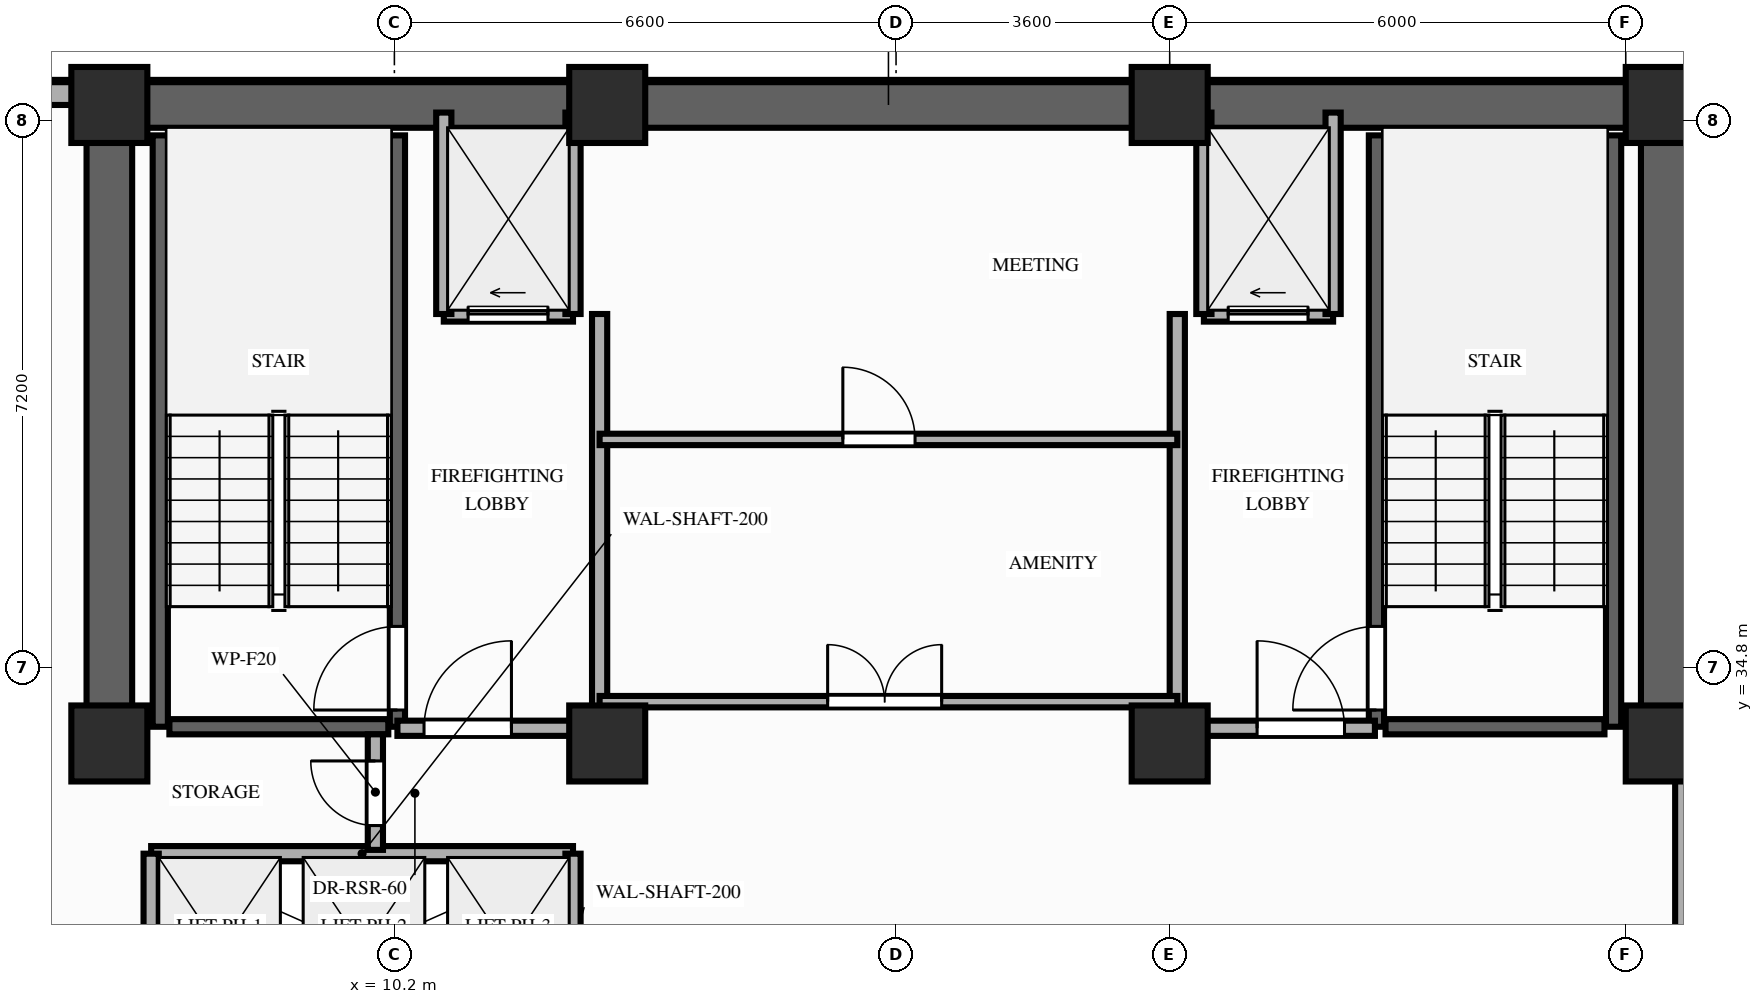
"""IFC4 building model, lengths in metres.
Left out: names, types, materials, properties, quantities, classifications, styles, units other than length and angle.
Written with IfcOpenShell. Run it as: python <this file> out.ifc"""

import sys

from ifc_helpers import new_model, si_unit, direction, frame, frame_2d, origin, origin_2d, place, context, subcontext, project, spatial, rectangle, extrude, element, fill, save


model = new_model("IFC4")
c1 = context("Model", 3, precision=1e-05, world=origin(), true_north=direction((0.0, 1.0)))
c2 = subcontext(c1, "Body", "Model", "MODEL_VIEW")
j1 = project(units=[si_unit("LENGTHUNIT", "METRE"), si_unit("PLANEANGLEUNIT", "RADIAN")], contexts=[c1])
p1 = place(None, origin())
s1 = spatial("IfcSite", under=j1, at=p1, CompositionType="ELEMENT")
p2 = place(p1, origin())
s2 = spatial("IfcBuilding", under=s1, at=p2, CompositionType="ELEMENT")
p3 = place(p2, frame((0.0, 0.0, 176.0)))
s3 = spatial("IfcBuildingStorey", under=s2, at=p3, CompositionType="ELEMENT", Elevation=176.0)
for number, where, z_axis, x_axis in (
    (1, (6.45, 33.8, 0.0), (0.0, 0.0, 1.0), (1.0, 0.0, 0.0)),
    (2, (13.0, 33.8, 0.0), (0.0, 0.0, 1.0), (1.0, 0.0, 0.0)),
    (3, (20.4, 33.8, 0.0), (0.0, 0.0, 1.0), (1.0, 0.0, 0.0)),
    (4, (26.9, 33.8, 0.0), (0.0, 0.0, 1.0), (1.0, 0.0, 0.0)),
    (5, (6.45, 42.2, 0.0), (0.0, 0.0, 1.0), (1.0, 0.0, 0.0)),
    (6, (13.0, 42.2, 0.0), (0.0, 0.0, 1.0), (1.0, 0.0, 0.0)),
    (7, (20.4, 42.2, 0.0), (0.0, 0.0, 1.0), (1.0, 0.0, 0.0)),
    (8, (26.9, 42.2, 0.0), (0.0, 0.0, 1.0), (1.0, 0.0, 0.0)),
):
    element("IfcColumn", number, at=place(p3, frame(where, z_axis=z_axis, x_axis=x_axis)), inside=s3, PredefinedType="COLUMN", context=c2, shape_type="SweptSolid", body=[
        extrude(rectangle(XDim=1.0, YDim=1.0, at=origin_2d()), origin(), (0.0, 0.0, 1.0), 3.2),
    ])
p4 = place(p3, frame((6.0, 42.35, 0.0), z_axis=(0.0, 0.0, 1.0), x_axis=(-1.0, 0.0, 0.0)))
e9 = element("IfcWall", 9, at=p4, inside=s3, PredefinedType="STANDARD", context=c2, shape_type="SweptSolid", body=[
    extrude(rectangle(XDim=2.0, YDim=0.3, at=frame_2d((1.0, 0.0))), origin(), (0.0, 0.0, 1.0), 3.02),
])
p5 = place(p3, frame((6.45, 42.2, 0.0), z_axis=(0.0, 0.0, 1.0), x_axis=(1.0, 0.0, 0.0)))
e10 = element("IfcWall", 10, at=p5, inside=s3, PredefinedType="SHEAR", context=c2, shape_type="SweptSolid", body=[
    extrude(rectangle(XDim=20.45, YDim=0.6, at=frame_2d((10.225, 0.0))), origin(), (0.0, 0.0, 1.0), 3.02),
])
for number, where, z_axis, x_axis in (
    (11, (6.45, 33.8, 0.0), (0.0, 0.0, 1.0), (0.0, 1.0, 0.0)),
    (12, (26.9, 33.8, 0.0), (0.0, 0.0, 1.0), (0.0, 1.0, 0.0)),
):
    element("IfcWall", number, at=place(p3, frame(where, z_axis=z_axis, x_axis=x_axis)), inside=s3, PredefinedType="SHEAR", context=c2, shape_type="SweptSolid", body=[
        extrude(rectangle(XDim=7.95, YDim=0.6, at=frame_2d((3.975, 0.0))), origin(), (0.0, 0.0, 1.0), 3.02),
    ])
p6 = place(p3, frame((7.12, 34.02, 0.0), z_axis=(0.0, 0.0, 1.0), x_axis=(0.0, 1.0, 0.0)))
e13 = element("IfcWall", 13, at=p6, inside=s3, PredefinedType="SHEAR", context=c2, shape_type="SweptSolid", body=[
    extrude(rectangle(XDim=7.78, YDim=0.2, at=frame_2d((3.89, 0.0))), origin(), (0.0, 0.0, 1.0), 3.02),
])
p7 = place(p3, frame((10.24, 34.02, 0.0), z_axis=(0.0, 0.0, 1.0), x_axis=(0.0, 1.0, 0.0)))
e14 = element("IfcWall", 14, at=p7, inside=s3, PredefinedType="SHEAR", context=c2, shape_type="SweptSolid", body=[
    extrude(rectangle(XDim=7.78, YDim=0.2, at=frame_2d((3.89, 0.0))), origin(), (0.0, 0.0, 1.0), 3.02),
])
p8 = place(p7, frame((0.22, 0.0, 0.0)))
e15 = element("IfcOpeningElement", 15, at=p8, cuts=e14, PredefinedType="OPENING", context=c2, shape_type="SweptSolid", body=[
    extrude(rectangle(XDim=1.1, YDim=2.15, at=frame_2d((0.55, 1.075))), frame((0.0, 0.11, 0.0), z_axis=(0.0, -1.0, 0.0), x_axis=(1.0, 0.0, 0.0)), (0.0, 0.0, 1.0), 0.22),
])
p9 = place(p3, frame((7.24, 34.02, 0.0), z_axis=(0.0, 0.0, 1.0), x_axis=(1.0, 0.0, 0.0)))
e16 = element("IfcWall", 16, at=p9, inside=s3, PredefinedType="SHEAR", context=c2, shape_type="SweptSolid", body=[
    extrude(rectangle(XDim=2.88, YDim=0.2, at=frame_2d((1.44, 0.0))), origin(), (0.0, 0.0, 1.0), 3.02),
])
p10 = place(p3, frame((23.12, 34.02, 0.0), z_axis=(0.0, 0.0, 1.0), x_axis=(0.0, 1.0, 0.0)))
e17 = element("IfcWall", 17, at=p10, inside=s3, PredefinedType="SHEAR", context=c2, shape_type="SweptSolid", body=[
    extrude(rectangle(XDim=7.78, YDim=0.2, at=frame_2d((3.89, 0.0))), origin(), (0.0, 0.0, 1.0), 3.02),
])
p11 = place(p10, frame((0.22, 0.0, 0.0)))
e18 = element("IfcOpeningElement", 18, at=p11, cuts=e17, PredefinedType="OPENING", context=c2, shape_type="SweptSolid", body=[
    extrude(rectangle(XDim=1.1, YDim=2.15, at=frame_2d((0.55, 1.075))), frame((0.0, 0.11, 0.0), z_axis=(0.0, -1.0, 0.0), x_axis=(1.0, 0.0, 0.0)), (0.0, 0.0, 1.0), 0.22),
])
p12 = place(p3, frame((26.24, 34.02, 0.0), z_axis=(0.0, 0.0, 1.0), x_axis=(0.0, 1.0, 0.0)))
e19 = element("IfcWall", 19, at=p12, inside=s3, PredefinedType="SHEAR", context=c2, shape_type="SweptSolid", body=[
    extrude(rectangle(XDim=7.78, YDim=0.2, at=frame_2d((3.89, 0.0))), origin(), (0.0, 0.0, 1.0), 3.02),
])
p13 = place(p3, frame((23.24, 34.02, 0.0), z_axis=(0.0, 0.0, 1.0), x_axis=(1.0, 0.0, 0.0)))
e20 = element("IfcWall", 20, at=p13, inside=s3, PredefinedType="SHEAR", context=c2, shape_type="SweptSolid", body=[
    extrude(rectangle(XDim=2.88, YDim=0.2, at=frame_2d((1.44, 0.0))), origin(), (0.0, 0.0, 1.0), 3.02),
])
p14 = place(p3, frame((7.0, 32.35, 0.0), z_axis=(0.0, 0.0, 1.0), x_axis=(1.0, 0.0, 0.0)))
e21 = element("IfcWall", 21, at=p14, inside=s3, PredefinedType="MOVABLE", context=c2, shape_type="SweptSolid", body=[
    extrude(rectangle(XDim=5.55, YDim=0.2, at=frame_2d((2.775, 0.0))), origin(), (0.0, 0.0, 1.0), 3.02),
])
for number, where, z_axis, x_axis in (
    (22, (7.0, 29.85, 0.0), (0.0, 0.0, 1.0), (0.0, 1.0, 0.0)),
    (23, (12.55, 29.85, 0.0), (0.0, 0.0, 1.0), (0.0, 1.0, 0.0)),
):
    element("IfcWall", number, at=place(p3, frame(where, z_axis=z_axis, x_axis=x_axis)), inside=s3, PredefinedType="MOVABLE", context=c2, shape_type="SweptSolid", body=[
        extrude(rectangle(XDim=2.5, YDim=0.2, at=frame_2d((1.25, 0.0))), origin(), (0.0, 0.0, 1.0), 3.02),
    ])
p15 = place(p3, frame((10.85, 39.45, 0.0), z_axis=(0.0, 0.0, 1.0), x_axis=(1.0, 0.0, 0.0)))
e24 = element("IfcWall", 24, at=p15, inside=s3, PredefinedType="MOVABLE", context=c2, shape_type="SweptSolid", body=[
    extrude(rectangle(XDim=1.7, YDim=0.2, at=frame_2d((0.85, 0.0))), origin(), (0.0, 0.0, 1.0), 3.02),
])
p16 = place(p15, frame((0.32, 0.0, 0.0)))
e25 = element("IfcOpeningElement", 25, at=p16, cuts=e24, PredefinedType="OPENING", context=c2, shape_type="SweptSolid", body=[
    extrude(rectangle(XDim=1.05, YDim=2.15, at=frame_2d((0.525, 1.075))), frame((0.0, 0.11, 0.0), z_axis=(0.0, -1.0, 0.0), x_axis=(1.0, 0.0, 0.0)), (0.0, 0.0, 1.0), 0.22),
])
p17 = place(p3, frame((20.85, 39.45, 0.0), z_axis=(0.0, 0.0, 1.0), x_axis=(1.0, 0.0, 0.0)))
e26 = element("IfcWall", 26, at=p17, inside=s3, PredefinedType="MOVABLE", context=c2, shape_type="SweptSolid", body=[
    extrude(rectangle(XDim=1.7, YDim=0.2, at=frame_2d((0.85, 0.0))), origin(), (0.0, 0.0, 1.0), 3.02),
])
p18 = place(p17, frame((0.32, 0.0, 0.0)))
e27 = element("IfcOpeningElement", 27, at=p18, cuts=e26, PredefinedType="OPENING", context=c2, shape_type="SweptSolid", body=[
    extrude(rectangle(XDim=1.05, YDim=2.15, at=frame_2d((0.525, 1.075))), frame((0.0, 0.11, 0.0), z_axis=(0.0, -1.0, 0.0), x_axis=(1.0, 0.0, 0.0)), (0.0, 0.0, 1.0), 0.22),
])
for number, where, z_axis, x_axis in (
    (28, (10.85, 39.45, 0.0), (0.0, 0.0, 1.0), (0.0, 1.0, 0.0)),
    (29, (12.55, 39.45, 0.0), (0.0, 0.0, 1.0), (0.0, 1.0, 0.0)),
):
    element("IfcWall", number, at=place(p3, frame(where, z_axis=z_axis, x_axis=x_axis)), inside=s3, PredefinedType="MOVABLE", context=c2, shape_type="SweptSolid", body=[
        extrude(rectangle(XDim=2.65, YDim=0.2, at=frame_2d((1.325, 0.0))), origin(), (0.0, 0.0, 1.0), 2.46),
    ])
p19 = place(p3, frame((12.9, 34.0, 0.0), z_axis=(0.0, 0.0, 1.0), x_axis=(0.0, 1.0, 0.0)))
e30 = element("IfcWall", 30, at=p19, inside=s3, PredefinedType="PARTITIONING", context=c2, shape_type="SweptSolid", body=[
    extrude(rectangle(XDim=5.45, YDim=0.2, at=frame_2d((2.725, 0.0))), origin(), (0.0, 0.0, 1.0), 2.46),
])
p20 = place(p3, frame((10.24, 34.0, 0.0), z_axis=(0.0, 0.0, 1.0), x_axis=(1.0, 0.0, 0.0)))
e31 = element("IfcWall", 31, at=p20, inside=s3, PredefinedType="PARTITIONING", context=c2, shape_type="SweptSolid", body=[
    extrude(rectangle(XDim=2.66, YDim=0.2, at=frame_2d((1.33, 0.0))), origin(), (0.0, 0.0, 1.0), 2.46),
])
p21 = place(p20, frame((0.35, 0.0, 0.0)))
e32 = element("IfcOpeningElement", 32, at=p21, cuts=e31, PredefinedType="OPENING", context=c2, shape_type="SweptSolid", body=[
    extrude(rectangle(XDim=1.15, YDim=2.15, at=frame_2d((0.575, 1.075))), frame((0.0, 0.11, 0.0), z_axis=(0.0, -1.0, 0.0), x_axis=(1.0, 0.0, 0.0)), (0.0, 0.0, 1.0), 0.22),
])
for number, where, z_axis, x_axis in (
    (33, (20.85, 39.45, 0.0), (0.0, 0.0, 1.0), (0.0, 1.0, 0.0)),
    (34, (22.55, 39.45, 0.0), (0.0, 0.0, 1.0), (0.0, 1.0, 0.0)),
):
    element("IfcWall", number, at=place(p3, frame(where, z_axis=z_axis, x_axis=x_axis)), inside=s3, PredefinedType="MOVABLE", context=c2, shape_type="SweptSolid", body=[
        extrude(rectangle(XDim=2.65, YDim=0.2, at=frame_2d((1.325, 0.0))), origin(), (0.0, 0.0, 1.0), 2.46),
    ])
p22 = place(p3, frame((20.5, 34.0, 0.0), z_axis=(0.0, 0.0, 1.0), x_axis=(0.0, 1.0, 0.0)))
e35 = element("IfcWall", 35, at=p22, inside=s3, PredefinedType="PARTITIONING", context=c2, shape_type="SweptSolid", body=[
    extrude(rectangle(XDim=5.45, YDim=0.2, at=frame_2d((2.725, 0.0))), origin(), (0.0, 0.0, 1.0), 2.46),
])
p23 = place(p3, frame((20.5, 34.0, 0.0), z_axis=(0.0, 0.0, 1.0), x_axis=(1.0, 0.0, 0.0)))
e36 = element("IfcWall", 36, at=p23, inside=s3, PredefinedType="PARTITIONING", context=c2, shape_type="SweptSolid", body=[
    extrude(rectangle(XDim=2.6, YDim=0.2, at=frame_2d((1.3, 0.0))), origin(), (0.0, 0.0, 1.0), 2.46),
])
p24 = place(p23, frame((1.05, 0.0, 0.0)))
e37 = element("IfcOpeningElement", 37, at=p24, cuts=e36, PredefinedType="OPENING", context=c2, shape_type="SweptSolid", body=[
    extrude(rectangle(XDim=1.15, YDim=2.15, at=frame_2d((0.575, 1.075))), frame((0.0, 0.11, 0.0), z_axis=(0.0, -1.0, 0.0), x_axis=(1.0, 0.0, 0.0)), (0.0, 0.0, 1.0), 0.22),
])
p25 = place(p3, frame((9.95, 32.4, 0.0), z_axis=(0.0, 0.0, 1.0), x_axis=(0.0, 1.0, 0.0)))
e38 = element("IfcWall", 38, at=p25, inside=s3, PredefinedType="PARTITIONING", context=c2, shape_type="SweptSolid", body=[
    extrude(rectangle(XDim=1.52, YDim=0.2, at=frame_2d((0.76, 0.0))), origin(), (0.0, 0.0, 1.0), 2.46),
])
p26 = place(p25, frame((0.32, 0.0, 0.0)))
e39 = element("IfcOpeningElement", 39, at=p26, cuts=e38, PredefinedType="OPENING", context=c2, shape_type="SweptSolid", body=[
    extrude(rectangle(XDim=0.85, YDim=2.05, at=frame_2d((0.425, 1.025))), frame((0.0, 0.11, 0.0), z_axis=(0.0, -1.0, 0.0), x_axis=(1.0, 0.0, 0.0)), (0.0, 0.0, 1.0), 0.22),
])
p27 = place(p3, frame((12.9, 34.35, 0.0), z_axis=(0.0, 0.0, 1.0), x_axis=(1.0, 0.0, 0.0)))
e40 = element("IfcWall", 40, at=p27, inside=s3, PredefinedType="PARTITIONING", context=c2, shape_type="SweptSolid", body=[
    extrude(rectangle(XDim=7.6, YDim=0.15, at=frame_2d((3.8, 0.0))), origin(), (0.0, 0.0, 1.0), 3.02),
])
p28 = place(p27, frame((3.0, 0.0, 0.0)))
e41 = element("IfcOpeningElement", 41, at=p28, cuts=e40, PredefinedType="OPENING", context=c2, shape_type="SweptSolid", body=[
    extrude(rectangle(XDim=1.5, YDim=2.15, at=frame_2d((0.75, 1.075))), frame((0.0, 0.085, 0.0), z_axis=(0.0, -1.0, 0.0), x_axis=(1.0, 0.0, 0.0)), (0.0, 0.0, 1.0), 0.17),
])
p29 = place(p3, frame((12.9, 37.8, 0.0), z_axis=(0.0, 0.0, 1.0), x_axis=(1.0, 0.0, 0.0)))
e42 = element("IfcWall", 42, at=p29, inside=s3, PredefinedType="PARTITIONING", context=c2, shape_type="SweptSolid", body=[
    extrude(rectangle(XDim=7.6, YDim=0.15, at=frame_2d((3.8, 0.0))), origin(), (0.0, 0.0, 1.0), 3.02),
])
p30 = place(p29, frame((3.2, 0.0, 0.0)))
e43 = element("IfcOpeningElement", 43, at=p30, cuts=e42, PredefinedType="OPENING", context=c2, shape_type="SweptSolid", body=[
    extrude(rectangle(XDim=0.95, YDim=2.15, at=frame_2d((0.475, 1.075))), frame((0.0, 0.085, 0.0), z_axis=(0.0, -1.0, 0.0), x_axis=(1.0, 0.0, 0.0)), (0.0, 0.0, 1.0), 0.17),
])
p31 = place(p3, frame((27.15, 31.2, 0.0), z_axis=(0.0, 0.0, 1.0), x_axis=(0.0, 1.0, 0.0)))
e44 = element("IfcWall", 44, at=p31, inside=s3, PredefinedType="PARTITIONING", context=c2, shape_type="SweptSolid", body=[
    extrude(rectangle(XDim=2.48, YDim=0.2, at=frame_2d((1.24, 0.0))), origin(), (0.0, 0.0, 1.0), 2.46),
])
p32 = place(p8, origin())
e45 = element("IfcDoor", 45, at=p32, inside=s3, OperationType="SINGLE_SWING_LEFT", PredefinedType="DOOR", context=c2, shape_type="SweptSolid", body=[
    extrude(rectangle(XDim=1.1, YDim=2.15, at=frame_2d((0.55, 1.075))), frame((0.0, 0.025, 0.0), z_axis=(0.0, -1.0, 0.0), x_axis=(1.0, 0.0, 0.0)), (0.0, 0.0, 1.0), 0.05),
])
fill(e15, e45)
p33 = place(p11, origin())
e46 = element("IfcDoor", 46, at=p33, inside=s3, OperationType="SINGLE_SWING_LEFT", PredefinedType="DOOR", context=c2, shape_type="SweptSolid", body=[
    extrude(rectangle(XDim=1.1, YDim=2.15, at=frame_2d((0.55, 1.075))), frame((0.0, 0.025, 0.0), z_axis=(0.0, -1.0, 0.0), x_axis=(1.0, 0.0, 0.0)), (0.0, 0.0, 1.0), 0.05),
])
fill(e18, e46)
p34 = place(p16, origin())
e47 = element("IfcDoor", 47, at=p34, inside=s3, OperationType="SLIDING_TO_LEFT", PredefinedType="DOOR", context=c2, shape_type="SweptSolid", body=[
    extrude(rectangle(XDim=1.05, YDim=2.15, at=frame_2d((0.525, 1.075))), frame((0.0, 0.025, 0.0), z_axis=(0.0, -1.0, 0.0), x_axis=(1.0, 0.0, 0.0)), (0.0, 0.0, 1.0), 0.05),
])
fill(e25, e47)
p35 = place(p18, origin())
e48 = element("IfcDoor", 48, at=p35, inside=s3, OperationType="SLIDING_TO_LEFT", PredefinedType="DOOR", context=c2, shape_type="SweptSolid", body=[
    extrude(rectangle(XDim=1.05, YDim=2.15, at=frame_2d((0.525, 1.075))), frame((0.0, 0.025, 0.0), z_axis=(0.0, -1.0, 0.0), x_axis=(1.0, 0.0, 0.0)), (0.0, 0.0, 1.0), 0.05),
])
fill(e27, e48)
p36 = place(p21, origin())
e49 = element("IfcDoor", 49, at=p36, inside=s3, OperationType="SINGLE_SWING_RIGHT", PredefinedType="DOOR", context=c2, shape_type="SweptSolid", body=[
    extrude(rectangle(XDim=1.15, YDim=2.15, at=frame_2d((0.575, 1.075))), frame((0.0, 0.025, 0.0), z_axis=(0.0, -1.0, 0.0), x_axis=(1.0, 0.0, 0.0)), (0.0, 0.0, 1.0), 0.05),
])
fill(e32, e49)
p37 = place(p24, origin())
e50 = element("IfcDoor", 50, at=p37, inside=s3, OperationType="SINGLE_SWING_LEFT", PredefinedType="DOOR", context=c2, shape_type="SweptSolid", body=[
    extrude(rectangle(XDim=1.15, YDim=2.15, at=frame_2d((0.575, 1.075))), frame((0.0, 0.025, 0.0), z_axis=(0.0, -1.0, 0.0), x_axis=(1.0, 0.0, 0.0)), (0.0, 0.0, 1.0), 0.05),
])
fill(e37, e50)
p38 = place(p26, origin())
e51 = element("IfcDoor", 51, at=p38, inside=s3, OperationType="SINGLE_SWING_RIGHT", PredefinedType="DOOR", context=c2, shape_type="SweptSolid", body=[
    extrude(rectangle(XDim=0.85, YDim=2.05, at=frame_2d((0.425, 1.025))), frame((0.0, 0.025, 0.0), z_axis=(0.0, -1.0, 0.0), x_axis=(1.0, 0.0, 0.0)), (0.0, 0.0, 1.0), 0.05),
])
fill(e39, e51)
p39 = place(p28, origin())
e52 = element("IfcDoor", 52, at=p39, inside=s3, OperationType="DOUBLE_DOOR_SINGLE_SWING", PredefinedType="DOOR", context=c2, shape_type="SweptSolid", body=[
    extrude(rectangle(XDim=1.5, YDim=2.15, at=frame_2d((0.75, 1.075))), frame((0.0, 0.025, 0.0), z_axis=(0.0, -1.0, 0.0), x_axis=(1.0, 0.0, 0.0)), (0.0, 0.0, 1.0), 0.05),
])
fill(e41, e52)
p40 = place(p30, origin())
e53 = element("IfcDoor", 53, at=p40, inside=s3, OperationType="SINGLE_SWING_LEFT", PredefinedType="DOOR", context=c2, shape_type="SweptSolid", body=[
    extrude(rectangle(XDim=0.95, YDim=2.15, at=frame_2d((0.475, 1.075))), frame((0.0, 0.025, 0.0), z_axis=(0.0, -1.0, 0.0), x_axis=(1.0, 0.0, 0.0)), (0.0, 0.0, 1.0), 0.05),
])
fill(e43, e53)
save(model, sys.argv[1])
